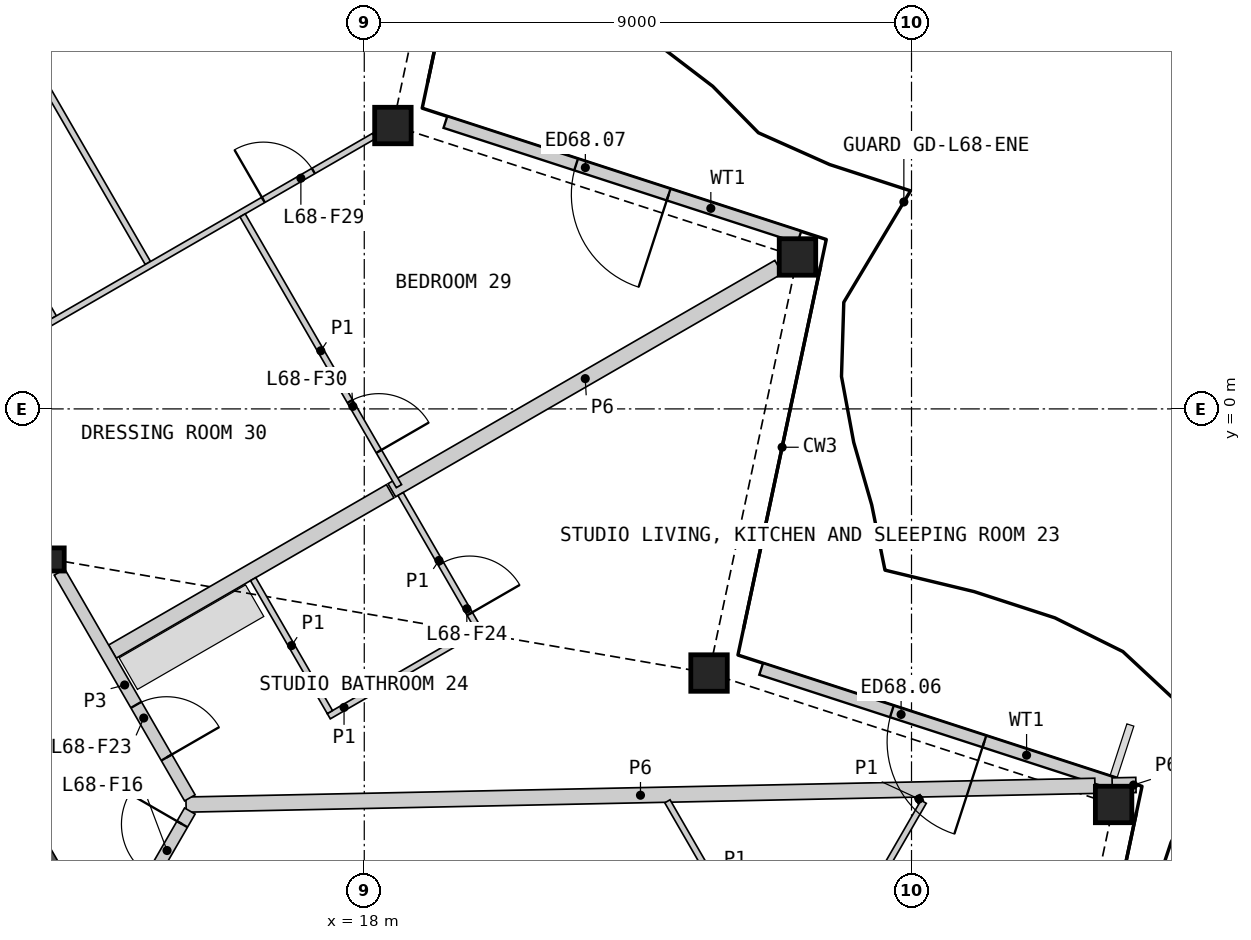
"""IFC4 building model, lengths in metres.
Left out: names, types, materials, properties, quantities, classifications, styles, units other than length and angle.
Written with IfcOpenShell. Run it as: python <this file> out.ifc"""

import sys

from ifc_helpers import new_model, si_unit, direction, frame, frame_2d, origin, origin_2d, place, context, subcontext, project, spatial, polyline, rectangle, hollow_rectangle, i_section, outline, extrude, element, fill, save


model = new_model("IFC4")
c1 = context("Model", 3, precision=1e-05, world=origin(), true_north=direction((0.0, 1.0)))
c2 = subcontext(c1, "Body", "Model", "MODEL_VIEW")
j1 = project(units=[si_unit("LENGTHUNIT", "METRE"), si_unit("PLANEANGLEUNIT", "RADIAN")], contexts=[c1])
p1 = place(None, origin())
s1 = spatial("IfcSite", under=j1, at=p1, CompositionType="ELEMENT")
p2 = place(p1, origin())
s2 = spatial("IfcBuilding", under=s1, at=p2, CompositionType="ELEMENT")
p3 = place(p2, frame((0.0, 0.0, 312.0)))
s3 = spatial("IfcBuildingStorey", under=s2, at=p3, CompositionType="ELEMENT", Elevation=312.0)
for number, where, z_axis, x_axis in (
    (1, (30.324, -6.506, 0.0), (0.0, 0.0, 1.0), (1.0, 0.0, 0.0)),
    (2, (23.67, -4.344, 0.0), (0.0, 0.0, 1.0), (1.0, 0.0, 0.0)),
    (3, (25.125, 2.499, 0.0), (0.0, 0.0, 1.0), (1.0, 0.0, 0.0)),
    (4, (18.471, 4.661, 0.0), (0.0, 0.0, 1.0), (1.0, 0.0, 0.0)),
):
    element("IfcColumn", number, at=place(p3, frame(where, z_axis=z_axis, x_axis=x_axis)), inside=s3, PredefinedType="COLUMN", context=c2, shape_type="SweptSolid", body=[
        extrude(hollow_rectangle(XDim=0.6, YDim=0.6, WallThickness=0.04, at=origin_2d()), origin(), (0.0, 0.0, 1.0), 3.4),
    ])
p4 = place(p3, frame((12.868, -2.476, 0.0), z_axis=(0.0, 0.0, 1.0), x_axis=(1.0, 0.0, 0.0)))
e5 = element("IfcColumn", 5, at=p4, inside=s3, PredefinedType="COLUMN", context=c2, shape_type="SweptSolid", body=[
    extrude(i_section(OverallWidth=0.396, OverallDepth=0.381, WebThickness=0.019, FlangeThickness=0.03, at=origin_2d()), origin(), (0.0, 0.0, 1.0), 3.4),
])
p5 = place(p3, frame((30.347, -6.168, 0.0), z_axis=(0.0, 0.0, 1.0), x_axis=(-0.951053709789, 0.309025631781, 0.0)))
e6 = element("IfcWall", 6, at=p5, inside=s3, PredefinedType="SOLIDWALL", context=c2, shape_type="SweptSolid", body=[
    extrude(rectangle(XDim=6.12, YDim=0.2, at=frame_2d((3.06, 0.0))), origin(), (0.0, 0.0, 1.0), 2.488),
])
p6 = place(p5, frame((2.26, 0.0, 0.0)))
e7 = element("IfcOpeningElement", 7, at=p6, cuts=e6, PredefinedType="OPENING", context=c2, shape_type="SweptSolid", body=[
    extrude(rectangle(XDim=1.6, YDim=2.25, at=frame_2d((0.8, 1.125))), frame((0.0, 0.11, 0.0), z_axis=(0.0, -1.0, 0.0), x_axis=(1.0, 0.0, 0.0)), (0.0, 0.0, 1.0), 0.22),
])
p7 = place(p3, frame((25.155, 2.826, 0.0), z_axis=(0.0, 0.0, 1.0), x_axis=(-0.951053709789, 0.309025631781, 0.0)))
e8 = element("IfcWall", 8, at=p7, inside=s3, PredefinedType="SOLIDWALL", context=c2, shape_type="SweptSolid", body=[
    extrude(rectangle(XDim=6.12, YDim=0.2, at=frame_2d((3.06, 0.0))), origin(), (0.0, 0.0, 1.0), 2.488),
])
p8 = place(p7, frame((2.26, 0.0, 0.0)))
e9 = element("IfcOpeningElement", 9, at=p8, cuts=e8, PredefinedType="OPENING", context=c2, shape_type="SweptSolid", body=[
    extrude(rectangle(XDim=1.6, YDim=2.25, at=frame_2d((0.8, 1.125))), frame((0.0, 0.11, 0.0), z_axis=(0.0, -1.0, 0.0), x_axis=(1.0, 0.0, 0.0)), (0.0, 0.0, 1.0), 0.22),
])
p9 = place(p3, origin())
e10 = element("IfcWall", 10, at=p9, inside=s3, PredefinedType="SHEAR", context=c2, shape_type="SweptSolid", body=[
    extrude(outline(polyline([(11.961, -7.506), (11.961, -6.906), (12.48, -6.606), (13.0, -7.506), (11.961, -7.506)])), origin(), (0.0, 0.0, 1.0), 3.1),
])
p10 = place(p3, frame((15.069, -6.508, 0.0), z_axis=(0.0, 0.0, 1.0), x_axis=(0.999786619639, 0.02065708573, 0.0)))
e11 = element("IfcWall", 11, at=p10, inside=s3, PredefinedType="PARTITIONING", context=c2, shape_type="SweptSolid", body=[
    extrude(rectangle(XDim=14.951, YDim=0.25, at=frame_2d((7.475, 0.0))), origin(), (0.0, 0.0, 1.0), 2.33),
])
p11 = place(p3, frame((18.454, -1.338, 0.0), z_axis=(0.0, 0.0, 1.0), x_axis=(0.866023407002, 0.500003458512, 0.0)))
e12 = element("IfcWall", 12, at=p11, inside=s3, PredefinedType="PARTITIONING", context=c2, shape_type="SweptSolid", body=[
    extrude(rectangle(XDim=7.345, YDim=0.25, at=frame_2d((3.673, 0.0))), origin(), (0.0, 0.0, 1.0), 2.33),
])
p12 = place(p3, frame((13.858, -3.991, 0.0), z_axis=(0.0, 0.0, 1.0), x_axis=(0.866032983855, 0.499986870703, 0.0)))
e13 = element("IfcWall", 13, at=p12, inside=s3, PredefinedType="PARTITIONING", context=c2, shape_type="SweptSolid", body=[
    extrude(rectangle(XDim=5.275, YDim=0.25, at=frame_2d((2.638, 0.0))), origin(), (0.0, 0.0, 1.0), 2.33),
])
p13 = place(p3, frame((12.988, -2.684, 0.0), z_axis=(0.0, 0.0, 1.0), x_axis=(0.500003406062, -0.866023437285, 0.0)))
e14 = element("IfcWall", 14, at=p13, inside=s3, PredefinedType="PARTITIONING", context=c2, shape_type="SweptSolid", body=[
    extrude(rectangle(XDim=4.288, YDim=0.2, at=frame_2d((2.144, 0.0))), origin(), (0.0, 0.0, 1.0), 3.1),
])
p14 = place(p13, frame((2.521, 0.0, 0.0)))
e15 = element("IfcOpeningElement", 15, at=p14, cuts=e14, PredefinedType="OPENING", context=c2, shape_type="SweptSolid", body=[
    extrude(rectangle(XDim=1.0, YDim=2.1, at=frame_2d((0.5, 1.05))), frame((0.0, 0.11, 0.0), z_axis=(0.0, -1.0, 0.0), x_axis=(1.0, 0.0, 0.0)), (0.0, 0.0, 1.0), 0.22),
])
p15 = place(p3, frame((13.293, -9.797, 0.0), z_axis=(0.0, 0.0, 1.0), x_axis=(0.499967746641, 0.866044024469, 0.0)))
e16 = element("IfcWall", 16, at=p15, inside=s3, PredefinedType="PARTITIONING", context=c2, shape_type="SweptSolid", body=[
    extrude(rectangle(XDim=3.676, YDim=0.2, at=frame_2d((1.838, 0.0))), origin(), (0.0, 0.0, 1.0), 3.1),
])
p16 = place(p15, frame((2.426, 0.0, 0.0)))
e17 = element("IfcOpeningElement", 17, at=p16, cuts=e16, PredefinedType="OPENING", context=c2, shape_type="SweptSolid", body=[
    extrude(rectangle(XDim=1.0, YDim=2.1, at=frame_2d((0.5, 1.05))), frame((0.0, 0.11, 0.0), z_axis=(0.0, -1.0, 0.0), x_axis=(1.0, 0.0, 0.0)), (0.0, 0.0, 1.0), 0.22),
])
p17 = place(p3, frame((30.301, -6.193, 0.0), z_axis=(0.0, 0.0, 1.0), x_axis=(0.999786840126, 0.020646411592, 0.0)))
e18 = element("IfcWall", 18, at=p17, inside=s3, PredefinedType="PARTITIONING", context=c2, shape_type="SweptSolid", body=[
    extrude(rectangle(XDim=0.39, YDim=0.25, at=frame_2d((0.195, 0.0))), origin(), (0.0, 0.0, 1.0), 2.33),
])
p18 = place(p3, frame((6.74, 15.739, 0.0), z_axis=(0.0, 0.0, 1.0), x_axis=(0.499995022685, -0.86602827742, 0.0)))
e19 = element("IfcWall", 19, at=p18, inside=s3, PredefinedType="PARTITIONING", context=c2, shape_type="SweptSolid", body=[
    extrude(rectangle(XDim=15.404, YDim=0.1, at=frame_2d((7.702, 0.0))), origin(), (0.0, 0.0, 1.0), 2.33),
])
p19 = place(p18, frame((8.582, 0.0, 0.0)))
e20 = element("IfcOpeningElement", 20, at=p19, cuts=e19, PredefinedType="OPENING", context=c2, shape_type="SweptSolid", body=[
    extrude(rectangle(XDim=0.95, YDim=2.1, at=frame_2d((0.475, 1.05))), frame((0.0, 0.06, 0.0), z_axis=(0.0, -1.0, 0.0), x_axis=(1.0, 0.0, 0.0)), (0.0, 0.0, 1.0), 0.12),
])
p20 = place(p3, frame((6.504, 12.572, 0.0), z_axis=(0.0, 0.0, 1.0), x_axis=(0.499998094172, -0.866026504112, 0.0)))
e21 = element("IfcWall", 21, at=p20, inside=s3, PredefinedType="PARTITIONING", context=c2, shape_type="SweptSolid", body=[
    extrude(rectangle(XDim=12.778, YDim=0.1, at=frame_2d((6.389, 0.0))), origin(), (0.0, 0.0, 1.0), 2.33),
])
p21 = place(p20, frame((3.759, 0.0, 0.0)))
e22 = element("IfcOpeningElement", 22, at=p21, cuts=e21, PredefinedType="OPENING", context=c2, shape_type="SweptSolid", body=[
    extrude(rectangle(XDim=0.95, YDim=2.1, at=frame_2d((0.475, 1.05))), frame((0.0, 0.06, 0.0), z_axis=(0.0, -1.0, 0.0), x_axis=(1.0, 0.0, 0.0)), (0.0, 0.0, 1.0), 0.12),
])
p22 = place(p3, frame((11.261, 0.506, 0.0), z_axis=(0.0, 0.0, 1.0), x_axis=(0.866024323732, 0.500001870701, 0.0)))
e23 = element("IfcWall", 23, at=p22, inside=s3, PredefinedType="PARTITIONING", context=c2, shape_type="SweptSolid", body=[
    extrude(rectangle(XDim=7.967, YDim=0.1, at=frame_2d((3.983, 0.0))), origin(), (0.0, 0.0, 1.0), 2.33),
])
p23 = place(p22, frame((5.865, 0.0, 0.0)))
e24 = element("IfcOpeningElement", 24, at=p23, cuts=e23, PredefinedType="OPENING", context=c2, shape_type="SweptSolid", body=[
    extrude(rectangle(XDim=0.95, YDim=2.1, at=frame_2d((0.475, 1.05))), frame((0.0, 0.06, 0.0), z_axis=(0.0, -1.0, 0.0), x_axis=(1.0, 0.0, 0.0)), (0.0, 0.0, 1.0), 0.12),
])
p24 = place(p3, frame((23.223, -13.35, 0.0), z_axis=(0.0, 0.0, 1.0), x_axis=(0.500018284498, 0.866014846967, 0.0)))
e25 = element("IfcWall", 25, at=p24, inside=s3, PredefinedType="PARTITIONING", context=c2, shape_type="SweptSolid", body=[
    extrude(rectangle(XDim=7.953, YDim=0.1, at=frame_2d((3.977, 0.0))), origin(), (0.0, 0.0, 1.0), 2.33),
])
p25 = place(p24, frame((1.951, 0.0, 0.0)))
e26 = element("IfcOpeningElement", 26, at=p25, cuts=e25, PredefinedType="OPENING", context=c2, shape_type="SweptSolid", body=[
    extrude(rectangle(XDim=0.95, YDim=2.1, at=frame_2d((0.475, 1.05))), frame((0.0, 0.06, 0.0), z_axis=(0.0, -1.0, 0.0), x_axis=(1.0, 0.0, 0.0)), (0.0, 0.0, 1.0), 0.12),
])
p26 = place(p3, frame((15.999, 3.183, 0.0), z_axis=(0.0, 0.0, 1.0), x_axis=(0.500014207086, -0.866017201164, 0.0)))
e27 = element("IfcWall", 27, at=p26, inside=s3, PredefinedType="PARTITIONING", context=c2, shape_type="SweptSolid", body=[
    extrude(rectangle(XDim=5.143, YDim=0.1, at=frame_2d((2.571, 0.0))), origin(), (0.0, 0.0, 1.0), 2.33),
])
p27 = place(p26, frame((3.532, 0.0, 0.0)))
e28 = element("IfcOpeningElement", 28, at=p27, cuts=e27, PredefinedType="OPENING", context=c2, shape_type="SweptSolid", body=[
    extrude(rectangle(XDim=0.95, YDim=2.1, at=frame_2d((0.475, 1.05))), frame((0.0, 0.06, 0.0), z_axis=(0.0, -1.0, 0.0), x_axis=(1.0, 0.0, 0.0)), (0.0, 0.0, 1.0), 0.12),
])
p28 = place(p3, frame((22.986, -6.454, 0.0), z_axis=(0.0, 0.0, 1.0), x_axis=(0.499978833458, -0.866037623948, 0.0)))
e29 = element("IfcWall", 29, at=p28, inside=s3, PredefinedType="PARTITIONING", context=c2, shape_type="SweptSolid", body=[
    extrude(rectangle(XDim=3.05, YDim=0.1, at=frame_2d((1.525, 0.0))), origin(), (0.0, 0.0, 1.0), 2.33),
])
p29 = place(p3, frame((17.416, -5.055, 0.0), z_axis=(0.0, 0.0, 1.0), x_axis=(0.866032775405, 0.499987231761, 0.0)))
e30 = element("IfcWall", 30, at=p29, inside=s3, PredefinedType="PARTITIONING", context=c2, shape_type="SweptSolid", body=[
    extrude(rectangle(XDim=2.9, YDim=0.1, at=frame_2d((1.45, 0.0))), origin(), (0.0, 0.0, 1.0), 2.33),
])
p30 = place(p3, frame((16.172, -2.8, 0.0), z_axis=(0.0, 0.0, 1.0), x_axis=(0.50001820224, -0.866014894461, 0.0)))
e31 = element("IfcWall", 31, at=p30, inside=s3, PredefinedType="PARTITIONING", context=c2, shape_type="SweptSolid", body=[
    extrude(rectangle(XDim=2.525, YDim=0.1, at=frame_2d((1.262, 0.0))), origin(), (0.0, 0.0, 1.0), 2.33),
])
p31 = place(p3, frame((18.597, -1.4, 0.0), z_axis=(0.0, 0.0, 1.0), x_axis=(0.499976333282, -0.866039067339, 0.0)))
e32 = element("IfcWall", 32, at=p31, inside=s3, PredefinedType="PARTITIONING", context=c2, shape_type="SweptSolid", body=[
    extrude(rectangle(XDim=2.525, YDim=0.1, at=frame_2d((1.262, 0.0))), origin(), (0.0, 0.0, 1.0), 2.33),
])
p32 = place(p31, frame((1.325, 0.0, 0.0)))
e33 = element("IfcOpeningElement", 33, at=p32, cuts=e32, PredefinedType="OPENING", context=c2, shape_type="SweptSolid", body=[
    extrude(rectangle(XDim=0.95, YDim=2.1, at=frame_2d((0.475, 1.05))), frame((0.0, 0.06, 0.0), z_axis=(0.0, -1.0, 0.0), x_axis=(1.0, 0.0, 0.0)), (0.0, 0.0, 1.0), 0.12),
])
p33 = place(p3, frame((27.096, -6.369, 0.0), z_axis=(0.0, 0.0, 1.0), x_axis=(0.500768285049, -0.865581379588, 0.0)))
e34 = element("IfcWall", 34, at=p33, inside=s3, PredefinedType="PARTITIONING", context=c2, shape_type="SweptSolid", body=[
    extrude(rectangle(XDim=0.108, YDim=0.1, at=frame_2d((0.054, 0.0))), origin(), (0.0, 0.0, 1.0), 2.33),
])
p34 = place(p6, origin())
e35 = element("IfcDoor", 35, at=p34, inside=s3, OperationType="DOUBLE_DOOR_SINGLE_SWING", PredefinedType="DOOR", context=c2, shape_type="SweptSolid", body=[
    extrude(rectangle(XDim=1.6, YDim=2.25, at=frame_2d((0.8, 1.125))), frame((0.0, 0.025, 0.0), z_axis=(0.0, -1.0, 0.0), x_axis=(1.0, 0.0, 0.0)), (0.0, 0.0, 1.0), 0.05),
])
fill(e7, e35)
p35 = place(p8, origin())
e36 = element("IfcDoor", 36, at=p35, inside=s3, OperationType="DOUBLE_DOOR_SINGLE_SWING", PredefinedType="DOOR", context=c2, shape_type="SweptSolid", body=[
    extrude(rectangle(XDim=1.6, YDim=2.25, at=frame_2d((0.8, 1.125))), frame((0.0, 0.025, 0.0), z_axis=(0.0, -1.0, 0.0), x_axis=(1.0, 0.0, 0.0)), (0.0, 0.0, 1.0), 0.05),
])
fill(e9, e36)
p36 = place(p16, origin())
e37 = element("IfcDoor", 37, at=p36, inside=s3, OperationType="SINGLE_SWING_RIGHT", PredefinedType="DOOR", context=c2, shape_type="SweptSolid", body=[
    extrude(rectangle(XDim=1.0, YDim=2.1, at=frame_2d((0.5, 1.05))), frame((0.0, 0.025, 0.0), z_axis=(0.0, -1.0, 0.0), x_axis=(1.0, 0.0, 0.0)), (0.0, 0.0, 1.0), 0.05),
])
fill(e17, e37)
p37 = place(p14, origin())
e38 = element("IfcDoor", 38, at=p37, inside=s3, OperationType="SINGLE_SWING_RIGHT", PredefinedType="DOOR", context=c2, shape_type="SweptSolid", body=[
    extrude(rectangle(XDim=1.0, YDim=2.1, at=frame_2d((0.5, 1.05))), frame((0.0, 0.025, 0.0), z_axis=(0.0, -1.0, 0.0), x_axis=(1.0, 0.0, 0.0)), (0.0, 0.0, 1.0), 0.05),
])
fill(e15, e38)
p38 = place(p32, origin())
e39 = element("IfcDoor", 39, at=p38, inside=s3, OperationType="SINGLE_SWING_RIGHT", PredefinedType="DOOR", context=c2, shape_type="SweptSolid", body=[
    extrude(rectangle(XDim=0.95, YDim=2.1, at=frame_2d((0.475, 1.05))), frame((0.0, 0.025, 0.0), z_axis=(0.0, -1.0, 0.0), x_axis=(1.0, 0.0, 0.0)), (0.0, 0.0, 1.0), 0.05),
])
fill(e33, e39)
p39 = place(p23, origin())
e40 = element("IfcDoor", 40, at=p39, inside=s3, OperationType="SINGLE_SWING_LEFT", PredefinedType="DOOR", context=c2, shape_type="SweptSolid", body=[
    extrude(rectangle(XDim=0.95, YDim=2.1, at=frame_2d((0.475, 1.05))), frame((0.0, 0.025, 0.0), z_axis=(0.0, -1.0, 0.0), x_axis=(1.0, 0.0, 0.0)), (0.0, 0.0, 1.0), 0.05),
])
fill(e24, e40)
p40 = place(p27, origin())
e41 = element("IfcDoor", 41, at=p40, inside=s3, OperationType="SINGLE_SWING_RIGHT", PredefinedType="DOOR", context=c2, shape_type="SweptSolid", body=[
    extrude(rectangle(XDim=0.95, YDim=2.1, at=frame_2d((0.475, 1.05))), frame((0.0, 0.025, 0.0), z_axis=(0.0, -1.0, 0.0), x_axis=(1.0, 0.0, 0.0)), (0.0, 0.0, 1.0), 0.05),
])
fill(e28, e41)
save(model, sys.argv[1])
